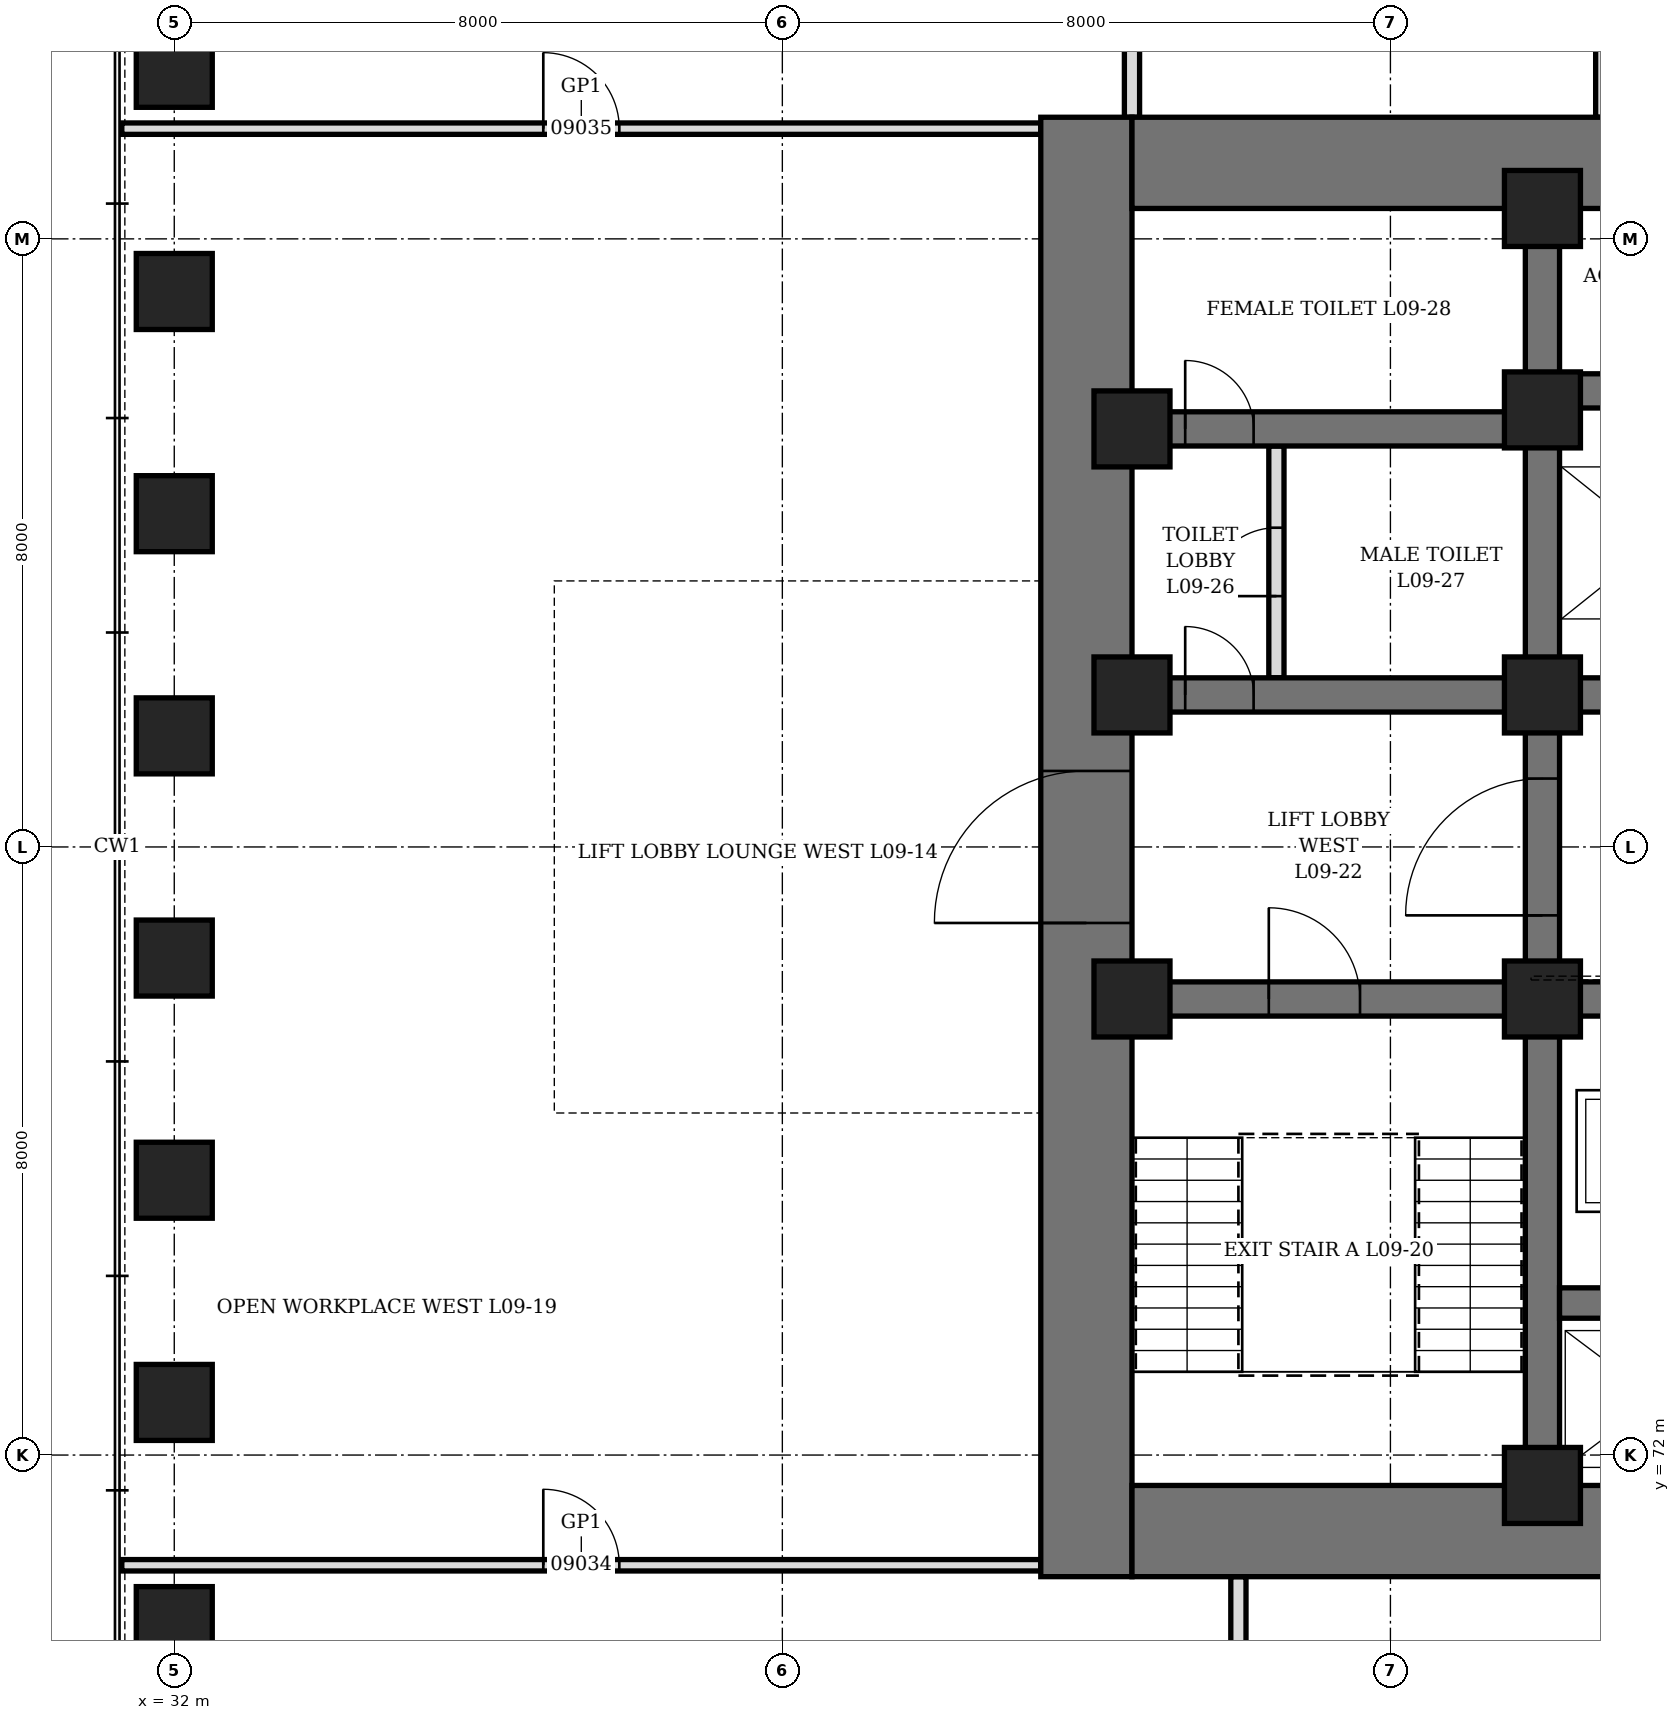
"""IFC4 building model, lengths in metres.
Left out: names, types, materials, properties, quantities, classifications, styles, units other than length and angle.
Written with IfcOpenShell. Run it as: python <this file> out.ifc"""

import sys

from ifc_helpers import new_model, si_unit, direction, frame, frame_2d, origin, origin_2d, place, context, subcontext, project, spatial, rectangle, hollow_rectangle, extrude, element, fill, save


model = new_model("IFC4")
c1 = context("Model", 3, precision=1e-05, world=origin(), true_north=direction((0.0, 1.0)))
c2 = subcontext(c1, "Body", "Model", "MODEL_VIEW")
j1 = project(units=[si_unit("LENGTHUNIT", "METRE"), si_unit("PLANEANGLEUNIT", "RADIAN")], contexts=[c1])
p1 = place(None, origin())
s1 = spatial("IfcSite", under=j1, at=p1, CompositionType="ELEMENT")
p2 = place(p1, origin())
s2 = spatial("IfcBuilding", under=s1, at=p2, CompositionType="ELEMENT")
p3 = place(p2, frame((0.0, 0.0, 47.5)))
s3 = spatial("IfcBuildingStorey", under=s2, at=p3, CompositionType="ELEMENT", Elevation=47.5)
for number, where, z_axis, x_axis in (
    (1, (32.0, 90.231, 0.0), (0.0, 0.0, 1.0), (0.0, 1.0, 0.0)),
    (2, (32.0, 87.308, 0.0), (0.0, 0.0, 1.0), (0.0, 1.0, 0.0)),
    (3, (32.0, 84.385, 0.0), (0.0, 0.0, 1.0), (0.0, 1.0, 0.0)),
    (4, (32.0, 81.461, 0.0), (0.0, 0.0, 1.0), (0.0, 1.0, 0.0)),
    (5, (32.0, 78.539, 0.0), (0.0, 0.0, 1.0), (0.0, 1.0, 0.0)),
    (6, (32.0, 75.615, 0.0), (0.0, 0.0, 1.0), (0.0, 1.0, 0.0)),
    (7, (32.0, 72.692, 0.0), (0.0, 0.0, 1.0), (0.0, 1.0, 0.0)),
    (8, (32.0, 69.769, 0.0), (0.0, 0.0, 1.0), (0.0, 1.0, 0.0)),
):
    element("IfcColumn", number, at=place(p3, frame(where, z_axis=z_axis, x_axis=x_axis)), inside=s3, PredefinedType="COLUMN", context=c2, shape_type="SweptSolid", body=[
        extrude(hollow_rectangle(XDim=1.0, YDim=1.0, WallThickness=0.25, at=origin_2d()), origin(), (0.0, 0.0, 1.0), 4.2),
    ])
p4 = place(p3, frame((44.0, 70.4, 0.0), z_axis=(0.0, 0.0, 1.0), x_axis=(0.0, 1.0, 0.0)))
e9 = element("IfcWall", 9, at=p4, inside=s3, PredefinedType="SHEAR", context=c2, shape_type="SweptSolid", body=[
    extrude(rectangle(XDim=19.2, YDim=1.2, at=frame_2d((9.6, 0.0))), origin(), (0.0, 0.0, 1.0), 4.2),
])
p5 = place(p4, frame((8.6, 0.0, 0.0)))
e10 = element("IfcOpeningElement", 10, at=p5, cuts=e9, PredefinedType="OPENING", context=c2, shape_type="SweptSolid", body=[
    extrude(rectangle(XDim=2.0, YDim=2.4, at=frame_2d((1.0, 1.2))), frame((0.0, 0.61, 0.0), z_axis=(0.0, -1.0, 0.0), x_axis=(1.0, 0.0, 0.0)), (0.0, 0.0, 1.0), 1.22),
])
p6 = place(p3, frame((44.6, 71.0, 0.0), z_axis=(0.0, 0.0, 1.0), x_axis=(1.0, 0.0, 0.0)))
e11 = element("IfcWall", 11, at=p6, inside=s3, PredefinedType="SHEAR", context=c2, shape_type="SweptSolid", body=[
    extrude(rectangle(XDim=22.8, YDim=1.2, at=frame_2d((11.4, 0.0))), origin(), (0.0, 0.0, 1.0), 4.2),
])
p7 = place(p3, frame((44.6, 89.0, 0.0), z_axis=(0.0, 0.0, 1.0), x_axis=(1.0, 0.0, 0.0)))
e12 = element("IfcWall", 12, at=p7, inside=s3, PredefinedType="SHEAR", context=c2, shape_type="SweptSolid", body=[
    extrude(rectangle(XDim=22.8, YDim=1.2, at=frame_2d((11.4, 0.0))), origin(), (0.0, 0.0, 1.0), 4.2),
])
p8 = place(p7, frame((6.325, 0.0, 0.0)))
e13 = element("IfcOpeningElement", 13, at=p8, cuts=e12, PredefinedType="OPENING", context=c2, shape_type="SweptSolid", body=[
    extrude(rectangle(XDim=1.0, YDim=2.1, at=frame_2d((0.5, 1.05))), frame((0.0, 0.61, 0.0), z_axis=(0.0, -1.0, 0.0), x_axis=(1.0, 0.0, 0.0)), (0.0, 0.0, 1.0), 1.22),
])
p9 = place(p7, frame((9.25, 0.0, 0.0)))
e14 = element("IfcOpeningElement", 14, at=p9, cuts=e12, PredefinedType="OPENING", context=c2, shape_type="SweptSolid", body=[
    extrude(rectangle(XDim=0.9, YDim=2.1, at=frame_2d((0.45, 1.05))), frame((0.0, 0.61, 0.0), z_axis=(0.0, -1.0, 0.0), x_axis=(1.0, 0.0, 0.0)), (0.0, 0.0, 1.0), 1.22),
])
p10 = place(p7, frame((13.012, 0.0, 0.0)))
e15 = element("IfcOpeningElement", 15, at=p10, cuts=e12, PredefinedType="OPENING", context=c2, shape_type="SweptSolid", body=[
    extrude(rectangle(XDim=0.9, YDim=2.1, at=frame_2d((0.45, 1.05))), frame((0.0, 0.61, 0.0), z_axis=(0.0, -1.0, 0.0), x_axis=(1.0, 0.0, 0.0)), (0.0, 0.0, 1.0), 1.22),
])
p11 = place(p3, frame((50.0, 71.6, 0.0), z_axis=(0.0, 0.0, 1.0), x_axis=(0.0, 1.0, 0.0)))
e16 = element("IfcWall", 16, at=p11, inside=s3, PredefinedType="SHEAR", context=c2, shape_type="SweptSolid", body=[
    extrude(rectangle(XDim=16.8, YDim=0.45, at=frame_2d((8.4, 0.0))), origin(), (0.0, 0.0, 1.0), 4.2),
])
p12 = place(p11, frame((7.5, 0.0, 0.0)))
e17 = element("IfcOpeningElement", 17, at=p12, cuts=e16, PredefinedType="OPENING", context=c2, shape_type="SweptSolid", body=[
    extrude(rectangle(XDim=1.8, YDim=2.4, at=frame_2d((0.9, 1.2))), frame((0.0, 0.235, 0.0), z_axis=(0.0, -1.0, 0.0), x_axis=(1.0, 0.0, 0.0)), (0.0, 0.0, 1.0), 0.47),
])
p13 = place(p3, frame((44.6, 78.0, 0.0), z_axis=(0.0, 0.0, 1.0), x_axis=(1.0, 0.0, 0.0)))
e18 = element("IfcWall", 18, at=p13, inside=s3, PredefinedType="SHEAR", context=c2, shape_type="SweptSolid", body=[
    extrude(rectangle(XDim=5.175, YDim=0.45, at=frame_2d((2.587, 0.0))), origin(), (0.0, 0.0, 1.0), 4.2),
])
p14 = place(p13, frame((1.8, 0.0, 0.0)))
e19 = element("IfcOpeningElement", 19, at=p14, cuts=e18, PredefinedType="OPENING", context=c2, shape_type="SweptSolid", body=[
    extrude(rectangle(XDim=1.2, YDim=2.1, at=frame_2d((0.6, 1.05))), frame((0.0, 0.235, 0.0), z_axis=(0.0, -1.0, 0.0), x_axis=(1.0, 0.0, 0.0)), (0.0, 0.0, 1.0), 0.47),
])
p15 = place(p3, frame((44.6, 82.0, 0.0), z_axis=(0.0, 0.0, 1.0), x_axis=(1.0, 0.0, 0.0)))
e20 = element("IfcWall", 20, at=p15, inside=s3, PredefinedType="SHEAR", context=c2, shape_type="SweptSolid", body=[
    extrude(rectangle(XDim=5.175, YDim=0.45, at=frame_2d((2.587, 0.0))), origin(), (0.0, 0.0, 1.0), 4.2),
])
p16 = place(p15, frame((0.7, 0.0, 0.0)))
e21 = element("IfcOpeningElement", 21, at=p16, cuts=e20, PredefinedType="OPENING", context=c2, shape_type="SweptSolid", body=[
    extrude(rectangle(XDim=0.9, YDim=2.1, at=frame_2d((0.45, 1.05))), frame((0.0, 0.235, 0.0), z_axis=(0.0, -1.0, 0.0), x_axis=(1.0, 0.0, 0.0)), (0.0, 0.0, 1.0), 0.47),
])
p17 = place(p3, frame((44.6, 85.5, 0.0), z_axis=(0.0, 0.0, 1.0), x_axis=(1.0, 0.0, 0.0)))
e22 = element("IfcWall", 22, at=p17, inside=s3, PredefinedType="SHEAR", context=c2, shape_type="SweptSolid", body=[
    extrude(rectangle(XDim=5.175, YDim=0.45, at=frame_2d((2.587, 0.0))), origin(), (0.0, 0.0, 1.0), 4.2),
])
p18 = place(p17, frame((0.7, 0.0, 0.0)))
e23 = element("IfcOpeningElement", 23, at=p18, cuts=e22, PredefinedType="OPENING", context=c2, shape_type="SweptSolid", body=[
    extrude(rectangle(XDim=0.9, YDim=2.1, at=frame_2d((0.45, 1.05))), frame((0.0, 0.235, 0.0), z_axis=(0.0, -1.0, 0.0), x_axis=(1.0, 0.0, 0.0)), (0.0, 0.0, 1.0), 0.47),
])
p19 = place(p3, frame((50.225, 78.0, 0.0), z_axis=(0.0, 0.0, 1.0), x_axis=(1.0, 0.0, 0.0)))
e24 = element("IfcWall", 24, at=p19, inside=s3, PredefinedType="SHEAR", context=c2, shape_type="SweptSolid", body=[
    extrude(rectangle(XDim=11.55, YDim=0.45, at=frame_2d((5.775, 0.0))), origin(), (0.0, 0.0, 1.0), 4.2),
])
p20 = place(p19, frame((0.725, 0.0, 0.0)))
e25 = element("IfcOpeningElement", 25, at=p20, cuts=e24, PredefinedType="OPENING", context=c2, shape_type="SweptSolid", body=[
    extrude(rectangle(XDim=1.1, YDim=2.2, at=frame_2d((0.55, 1.1))), frame((0.0, 0.235, 0.0), z_axis=(0.0, -1.0, 0.0), x_axis=(1.0, 0.0, 0.0)), (0.0, 0.0, 1.0), 0.47),
])
p21 = place(p19, frame((3.725, 0.0, 0.0)))
e26 = element("IfcOpeningElement", 26, at=p21, cuts=e24, PredefinedType="OPENING", context=c2, shape_type="SweptSolid", body=[
    extrude(rectangle(XDim=1.1, YDim=2.2, at=frame_2d((0.55, 1.1))), frame((0.0, 0.235, 0.0), z_axis=(0.0, -1.0, 0.0), x_axis=(1.0, 0.0, 0.0)), (0.0, 0.0, 1.0), 0.47),
])
p22 = place(p19, frame((6.725, 0.0, 0.0)))
e27 = element("IfcOpeningElement", 27, at=p22, cuts=e24, PredefinedType="OPENING", context=c2, shape_type="SweptSolid", body=[
    extrude(rectangle(XDim=1.1, YDim=2.2, at=frame_2d((0.55, 1.1))), frame((0.0, 0.235, 0.0), z_axis=(0.0, -1.0, 0.0), x_axis=(1.0, 0.0, 0.0)), (0.0, 0.0, 1.0), 0.47),
])
p23 = place(p19, frame((9.725, 0.0, 0.0)))
e28 = element("IfcOpeningElement", 28, at=p23, cuts=e24, PredefinedType="OPENING", context=c2, shape_type="SweptSolid", body=[
    extrude(rectangle(XDim=1.1, YDim=2.2, at=frame_2d((0.55, 1.1))), frame((0.0, 0.235, 0.0), z_axis=(0.0, -1.0, 0.0), x_axis=(1.0, 0.0, 0.0)), (0.0, 0.0, 1.0), 0.47),
])
for number, where, z_axis, x_axis in (
    (29, (50.225, 82.0, 0.0), (0.0, 0.0, 1.0), (1.0, 0.0, 0.0)),
    (30, (50.225, 86.0, 0.0), (0.0, 0.0, 1.0), (1.0, 0.0, 0.0)),
):
    element("IfcWall", number, at=place(p3, frame(where, z_axis=z_axis, x_axis=x_axis)), inside=s3, PredefinedType="SHEAR", context=c2, shape_type="SweptSolid", body=[
        extrude(rectangle(XDim=11.55, YDim=0.45, at=frame_2d((5.775, 0.0))), origin(), (0.0, 0.0, 1.0), 4.2),
    ])
p24 = place(p3, frame((50.225, 74.0, 0.0), z_axis=(0.0, 0.0, 1.0), x_axis=(1.0, 0.0, 0.0)))
e31 = element("IfcWall", 31, at=p24, inside=s3, PredefinedType="SHEAR", context=c2, shape_type="SweptSolid", body=[
    extrude(rectangle(XDim=11.55, YDim=0.4, at=frame_2d((5.775, 0.0))), origin(), (0.0, 0.0, 1.0), 4.2),
])
for number, where, z_axis, x_axis in (
    (32, (44.6, 78.0, 0.0), (0.0, 0.0, 1.0), (1.0, 0.0, 0.0)),
    (33, (44.6, 82.0, 0.0), (0.0, 0.0, 1.0), (1.0, 0.0, 0.0)),
    (34, (44.6, 85.5, 0.0), (0.0, 0.0, 1.0), (1.0, 0.0, 0.0)),
    (35, (50.0, 71.6, 0.0), (0.0, 0.0, 1.0), (1.0, 0.0, 0.0)),
    (36, (50.0, 78.0, 0.0), (0.0, 0.0, 1.0), (1.0, 0.0, 0.0)),
    (37, (50.0, 82.0, 0.0), (0.0, 0.0, 1.0), (1.0, 0.0, 0.0)),
    (38, (50.0, 85.75, 0.0), (0.0, 0.0, 1.0), (1.0, 0.0, 0.0)),
    (39, (50.0, 88.4, 0.0), (0.0, 0.0, 1.0), (1.0, 0.0, 0.0)),
):
    element("IfcColumn", number, at=place(p3, frame(where, z_axis=z_axis, x_axis=x_axis)), inside=s3, PredefinedType="COLUMN", context=c2, shape_type="SweptSolid", body=[
        extrude(hollow_rectangle(XDim=1.0, YDim=1.0, WallThickness=0.15, at=origin_2d()), origin(), (0.0, 0.0, 1.0), 4.2),
    ])
p25 = place(p3, frame((46.5, 82.225, 0.0), z_axis=(0.0, 0.0, 1.0), x_axis=(0.0, 1.0, 0.0)))
e40 = element("IfcWall", 40, at=p25, inside=s3, PredefinedType="PARTITIONING", context=c2, shape_type="SweptSolid", body=[
    extrude(rectangle(XDim=3.05, YDim=0.2, at=frame_2d((1.525, 0.0))), origin(), (0.0, 0.0, 1.0), 4.04),
])
p26 = place(p25, frame((1.075, 0.0, 0.0)))
e41 = element("IfcOpeningElement", 41, at=p26, cuts=e40, PredefinedType="OPENING", context=c2, shape_type="SweptSolid", body=[
    extrude(rectangle(XDim=0.9, YDim=2.1, at=frame_2d((0.45, 1.05))), frame((0.0, 0.11, 0.0), z_axis=(0.0, -1.0, 0.0), x_axis=(1.0, 0.0, 0.0)), (0.0, 0.0, 1.0), 0.22),
])
p27 = place(p3, frame((46.0, 66.8, 0.0), z_axis=(0.0, 0.0, 1.0), x_axis=(0.0, 1.0, 0.0)))
e42 = element("IfcWall", 42, at=p27, inside=s3, PredefinedType="PARTITIONING", context=c2, shape_type="SweptSolid", body=[
    extrude(rectangle(XDim=3.6, YDim=0.2, at=frame_2d((1.8, 0.0))), origin(), (0.0, 0.0, 1.0), 4.04),
])
for number, where, z_axis, x_axis in (
    (43, (44.6, 89.6, 0.0), (0.0, 0.0, 1.0), (0.0, 1.0, 0.0)),
    (44, (50.8, 89.6, 0.0), (0.0, 0.0, 1.0), (0.0, 1.0, 0.0)),
):
    element("IfcWall", number, at=place(p3, frame(where, z_axis=z_axis, x_axis=x_axis)), inside=s3, PredefinedType="PARTITIONING", context=c2, shape_type="SweptSolid", body=[
        extrude(rectangle(XDim=3.0, YDim=0.2, at=frame_2d((1.5, 0.0))), origin(), (0.0, 0.0, 1.0), 4.04),
    ])
p28 = place(p3, frame((31.31, 70.55, 0.0), z_axis=(0.0, 0.0, 1.0), x_axis=(1.0, 0.0, 0.0)))
e45 = element("IfcWall", 45, at=p28, inside=s3, PredefinedType="PARTITIONING", context=c2, shape_type="SweptSolid", body=[
    extrude(rectangle(XDim=12.09, YDim=0.15, at=frame_2d((6.045, 0.0))), origin(), (0.0, 0.0, 1.0), 4.04),
])
p29 = place(p28, frame((5.545, 0.0, 0.0)))
e46 = element("IfcOpeningElement", 46, at=p29, cuts=e45, PredefinedType="OPENING", context=c2, shape_type="SweptSolid", body=[
    extrude(rectangle(XDim=1.0, YDim=2.4, at=frame_2d((0.5, 1.2))), frame((0.0, 0.085, 0.0), z_axis=(0.0, -1.0, 0.0), x_axis=(1.0, 0.0, 0.0)), (0.0, 0.0, 1.0), 0.17),
])
p30 = place(p3, frame((31.31, 89.45, 0.0), z_axis=(0.0, 0.0, 1.0), x_axis=(1.0, 0.0, 0.0)))
e47 = element("IfcWall", 47, at=p30, inside=s3, PredefinedType="PARTITIONING", context=c2, shape_type="SweptSolid", body=[
    extrude(rectangle(XDim=12.09, YDim=0.15, at=frame_2d((6.045, 0.0))), origin(), (0.0, 0.0, 1.0), 4.04),
])
p31 = place(p30, frame((5.545, 0.0, 0.0)))
e48 = element("IfcOpeningElement", 48, at=p31, cuts=e47, PredefinedType="OPENING", context=c2, shape_type="SweptSolid", body=[
    extrude(rectangle(XDim=1.0, YDim=2.4, at=frame_2d((0.5, 1.2))), frame((0.0, 0.085, 0.0), z_axis=(0.0, -1.0, 0.0), x_axis=(1.0, 0.0, 0.0)), (0.0, 0.0, 1.0), 0.17),
])
p32 = place(p16, origin())
e49 = element("IfcDoor", 49, at=p32, inside=s3, OperationType="SINGLE_SWING_LEFT", PredefinedType="DOOR", context=c2, shape_type="SweptSolid", body=[
    extrude(rectangle(XDim=0.9, YDim=2.1, at=frame_2d((0.45, 1.05))), frame((0.0, 0.225, 0.0), z_axis=(0.0, -1.0, 0.0), x_axis=(1.0, 0.0, 0.0)), (0.0, 0.0, 1.0), 0.449),
])
fill(e21, e49)
p33 = place(p26, origin())
e50 = element("IfcDoor", 50, at=p33, inside=s3, OperationType="SINGLE_SWING_RIGHT", PredefinedType="DOOR", context=c2, shape_type="SweptSolid", body=[
    extrude(rectangle(XDim=0.9, YDim=2.1, at=frame_2d((0.45, 1.05))), frame((0.0, 0.1, 0.0), z_axis=(0.0, -1.0, 0.0), x_axis=(1.0, 0.0, 0.0)), (0.0, 0.0, 1.0), 0.199),
])
fill(e41, e50)
p34 = place(p18, origin())
e51 = element("IfcDoor", 51, at=p34, inside=s3, OperationType="SINGLE_SWING_RIGHT", PredefinedType="DOOR", context=c2, shape_type="SweptSolid", body=[
    extrude(rectangle(XDim=0.9, YDim=2.1, at=frame_2d((0.45, 1.05))), frame((0.0, 0.225, 0.0), z_axis=(0.0, -1.0, 0.0), x_axis=(1.0, 0.0, 0.0)), (0.0, 0.0, 1.0), 0.449),
])
fill(e23, e51)
p35 = place(p14, origin())
e52 = element("IfcDoor", 52, at=p35, inside=s3, OperationType="SINGLE_SWING_LEFT", PredefinedType="DOOR", context=c2, shape_type="SweptSolid", body=[
    extrude(rectangle(XDim=1.2, YDim=2.1, at=frame_2d((0.6, 1.05))), frame((0.0, 0.225, 0.0), z_axis=(0.0, -1.0, 0.0), x_axis=(1.0, 0.0, 0.0)), (0.0, 0.0, 1.0), 0.449),
])
fill(e19, e52)
p36 = place(p5, origin())
e53 = element("IfcDoor", 53, at=p36, inside=s3, OperationType="DOUBLE_DOOR_SINGLE_SWING", PredefinedType="DOOR", context=c2, shape_type="SweptSolid", body=[
    extrude(rectangle(XDim=2.0, YDim=2.4, at=frame_2d((1.0, 1.2))), frame((0.0, 0.35, 0.0), z_axis=(0.0, -1.0, 0.0), x_axis=(1.0, 0.0, 0.0)), (0.0, 0.0, 1.0), 0.7),
])
fill(e10, e53)
p37 = place(p12, origin())
e54 = element("IfcDoor", 54, at=p37, inside=s3, OperationType="DOUBLE_DOOR_SINGLE_SWING", PredefinedType="DOOR", context=c2, shape_type="SweptSolid", body=[
    extrude(rectangle(XDim=1.8, YDim=2.4, at=frame_2d((0.9, 1.2))), frame((0.0, 0.225, 0.0), z_axis=(0.0, -1.0, 0.0), x_axis=(1.0, 0.0, 0.0)), (0.0, 0.0, 1.0), 0.449),
])
fill(e17, e54)
p38 = place(p29, origin())
e55 = element("IfcDoor", 55, at=p38, inside=s3, OperationType="SINGLE_SWING_RIGHT", PredefinedType="DOOR", context=c2, shape_type="SweptSolid", body=[
    extrude(rectangle(XDim=1.0, YDim=2.4, at=frame_2d((0.5, 1.2))), frame((0.0, 0.075, 0.0), z_axis=(0.0, -1.0, 0.0), x_axis=(1.0, 0.0, 0.0)), (0.0, 0.0, 1.0), 0.149),
])
fill(e46, e55)
p39 = place(p31, origin())
e56 = element("IfcDoor", 56, at=p39, inside=s3, OperationType="SINGLE_SWING_RIGHT", PredefinedType="DOOR", context=c2, shape_type="SweptSolid", body=[
    extrude(rectangle(XDim=1.0, YDim=2.4, at=frame_2d((0.5, 1.2))), frame((0.0, 0.075, 0.0), z_axis=(0.0, -1.0, 0.0), x_axis=(1.0, 0.0, 0.0)), (0.0, 0.0, 1.0), 0.149),
])
fill(e48, e56)
save(model, sys.argv[1])
